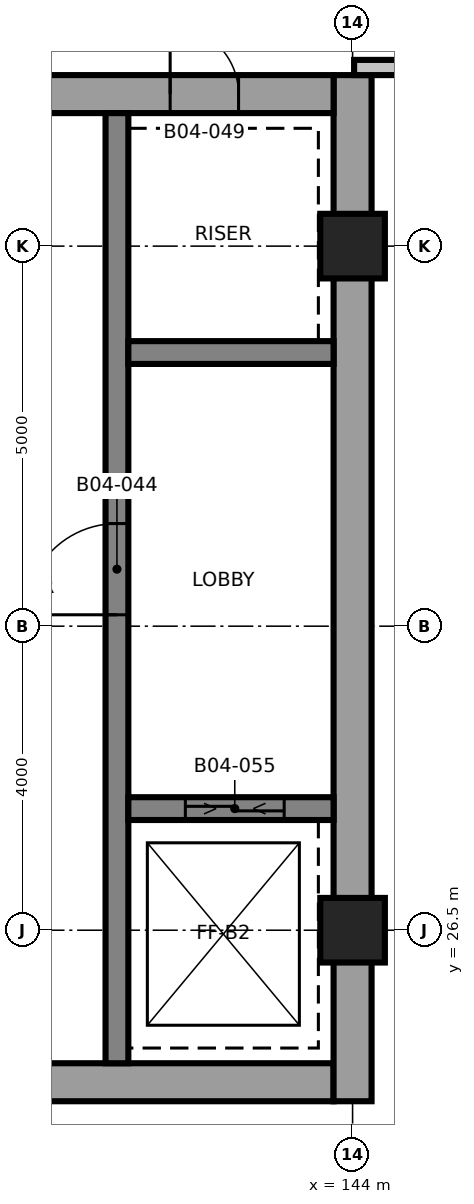
"""IFC4 building model, lengths in metres.
Left out: names, types, materials, properties, quantities, classifications, styles, units other than length and angle.
Written with IfcOpenShell. Run it as: python <this file> out.ifc"""

import sys

from ifc_helpers import new_model, si_unit, direction, frame, frame_2d, origin, origin_2d, place, context, subcontext, project, spatial, rectangle, extrude, element, fill, save


model = new_model("IFC4")
c1 = context("Model", 3, precision=1e-05, world=origin(), true_north=direction((0.0, 1.0)))
c2 = subcontext(c1, "Body", "Model", "MODEL_VIEW")
j1 = project(units=[si_unit("LENGTHUNIT", "METRE"), si_unit("PLANEANGLEUNIT", "RADIAN")], contexts=[c1])
p1 = place(None, origin())
s1 = spatial("IfcSite", under=j1, at=p1, CompositionType="ELEMENT")
p2 = place(p1, origin())
s2 = spatial("IfcBuilding", under=s1, at=p2, CompositionType="ELEMENT")
p3 = place(p2, frame((0.0, 0.0, 63.1)))
s3 = spatial("IfcBuildingStorey", under=s2, at=p3, CompositionType="ELEMENT", Elevation=63.1)
p4 = place(p3, frame((128.75, 24.5, 0.0), z_axis=(0.0, 0.0, 1.0), x_axis=(1.0, 0.0, 0.0)))
e1 = element("IfcWall", 1, at=p4, inside=s3, PredefinedType="SHEAR", context=c2, shape_type="SweptSolid", body=[
    extrude(rectangle(XDim=15.0, YDim=0.5, at=frame_2d((7.5, 0.0))), origin(), (0.0, 0.0, 1.0), 3.7),
])
p5 = place(p4, frame((9.65, 0.0, 0.0)))
e2 = element("IfcOpeningElement", 2, at=p5, cuts=e1, PredefinedType="OPENING", context=c2, shape_type="SweptSolid", body=[
    extrude(rectangle(XDim=1.5, YDim=2.1, at=frame_2d((0.75, 1.05))), frame((0.0, 0.26, 0.0), z_axis=(0.0, -1.0, 0.0), x_axis=(1.0, 0.0, 0.0)), (0.0, 0.0, 1.0), 0.52),
])
p6 = place(p4, frame((1.25, 0.0, 0.0)))
e3 = element("IfcOpeningElement", 3, at=p6, cuts=e1, PredefinedType="OPENING", context=c2, shape_type="SweptSolid", body=[
    extrude(rectangle(XDim=0.9, YDim=2.1, at=frame_2d((0.45, 1.05))), frame((0.0, 0.26, 0.0), z_axis=(0.0, -1.0, 0.0), x_axis=(1.0, 0.0, 0.0)), (0.0, 0.0, 1.0), 0.52),
])
p7 = place(p3, frame((144.0, 24.25, 0.0), z_axis=(0.0, 0.0, 1.0), x_axis=(0.0, 1.0, 0.0)))
e4 = element("IfcWall", 4, at=p7, inside=s3, PredefinedType="SHEAR", context=c2, shape_type="SweptSolid", body=[
    extrude(rectangle(XDim=13.5, YDim=0.5, at=frame_2d((6.75, 0.0))), origin(), (0.0, 0.0, 1.0), 3.7),
])
p8 = place(p3, frame((128.75, 37.5, 0.0), z_axis=(0.0, 0.0, 1.0), x_axis=(1.0, 0.0, 0.0)))
e5 = element("IfcWall", 5, at=p8, inside=s3, PredefinedType="SHEAR", context=c2, shape_type="SweptSolid", body=[
    extrude(rectangle(XDim=15.0, YDim=0.5, at=frame_2d((7.5, 0.0))), origin(), (0.0, 0.0, 1.0), 3.7),
])
p9 = place(p8, frame((9.65, 0.0, 0.0)))
e6 = element("IfcOpeningElement", 6, at=p9, cuts=e5, PredefinedType="OPENING", context=c2, shape_type="SweptSolid", body=[
    extrude(rectangle(XDim=1.5, YDim=2.1, at=frame_2d((0.75, 1.05))), frame((0.0, 0.26, 0.0), z_axis=(0.0, -1.0, 0.0), x_axis=(1.0, 0.0, 0.0)), (0.0, 0.0, 1.0), 0.52),
])
p10 = place(p8, frame((12.85, 0.0, 0.0)))
e7 = element("IfcOpeningElement", 7, at=p10, cuts=e5, PredefinedType="OPENING", context=c2, shape_type="SweptSolid", body=[
    extrude(rectangle(XDim=0.9, YDim=2.1, at=frame_2d((0.45, 1.05))), frame((0.0, 0.26, 0.0), z_axis=(0.0, -1.0, 0.0), x_axis=(1.0, 0.0, 0.0)), (0.0, 0.0, 1.0), 0.52),
])
p11 = place(p8, frame((3.6, 0.0, 0.0)))
e8 = element("IfcOpeningElement", 8, at=p11, cuts=e5, PredefinedType="OPENING", context=c2, shape_type="SweptSolid", body=[
    extrude(rectangle(XDim=0.9, YDim=2.1, at=frame_2d((0.45, 1.05))), frame((0.0, 0.26, 0.0), z_axis=(0.0, -1.0, 0.0), x_axis=(1.0, 0.0, 0.0)), (0.0, 0.0, 1.0), 0.52),
])
p12 = place(p8, frame((6.5, 0.0, 0.0)))
e9 = element("IfcOpeningElement", 9, at=p12, cuts=e5, PredefinedType="OPENING", context=c2, shape_type="SweptSolid", body=[
    extrude(rectangle(XDim=0.9, YDim=2.1, at=frame_2d((0.45, 1.05))), frame((0.0, 0.26, 0.0), z_axis=(0.0, -1.0, 0.0), x_axis=(1.0, 0.0, 0.0)), (0.0, 0.0, 1.0), 0.52),
])
p13 = place(p3, frame((140.9, 24.75, 0.0), z_axis=(0.0, 0.0, 1.0), x_axis=(0.0, 1.0, 0.0)))
e10 = element("IfcWall", 10, at=p13, inside=s3, PredefinedType="SHEAR", context=c2, shape_type="SweptSolid", body=[
    extrude(rectangle(XDim=12.5, YDim=0.3, at=frame_2d((6.25, 0.0))), origin(), (0.0, 0.0, 1.0), 3.7),
])
p14 = place(p13, frame((5.9, 0.0, 0.0)))
e11 = element("IfcOpeningElement", 11, at=p14, cuts=e10, PredefinedType="OPENING", context=c2, shape_type="SweptSolid", body=[
    extrude(rectangle(XDim=1.2, YDim=2.1, at=frame_2d((0.6, 1.05))), frame((0.0, 0.16, 0.0), z_axis=(0.0, -1.0, 0.0), x_axis=(1.0, 0.0, 0.0)), (0.0, 0.0, 1.0), 0.32),
])
p15 = place(p3, frame((141.05, 28.1, 0.0), z_axis=(0.0, 0.0, 1.0), x_axis=(1.0, 0.0, 0.0)))
e12 = element("IfcWall", 12, at=p15, inside=s3, PredefinedType="SHEAR", context=c2, shape_type="SweptSolid", body=[
    extrude(rectangle(XDim=2.7, YDim=0.3, at=frame_2d((1.35, 0.0))), origin(), (0.0, 0.0, 1.0), 3.7),
])
p16 = place(p15, frame((0.75, 0.0, 0.0)))
e13 = element("IfcOpeningElement", 13, at=p16, cuts=e12, PredefinedType="OPENING", context=c2, shape_type="SweptSolid", body=[
    extrude(rectangle(XDim=1.3, YDim=2.4, at=frame_2d((0.65, 1.2))), frame((0.0, 0.16, 0.0), z_axis=(0.0, -1.0, 0.0), x_axis=(1.0, 0.0, 0.0)), (0.0, 0.0, 1.0), 0.32),
])
p17 = place(p3, frame((141.05, 34.1, 0.0), z_axis=(0.0, 0.0, 1.0), x_axis=(1.0, 0.0, 0.0)))
e14 = element("IfcWall", 14, at=p17, inside=s3, PredefinedType="SHEAR", context=c2, shape_type="SweptSolid", body=[
    extrude(rectangle(XDim=2.7, YDim=0.3, at=frame_2d((1.35, 0.0))), origin(), (0.0, 0.0, 1.0), 3.7),
])
for number, where, z_axis, x_axis in (
    (15, (144.0, 26.5, 0.0), (0.0, 0.0, 1.0), (1.0, 0.0, 0.0)),
    (16, (144.0, 35.5, 0.0), (0.0, 0.0, 1.0), (1.0, 0.0, 0.0)),
):
    element("IfcColumn", number, at=place(p3, frame(where, z_axis=z_axis, x_axis=x_axis)), inside=s3, PredefinedType="COLUMN", context=c2, shape_type="SweptSolid", body=[
        extrude(rectangle(XDim=0.85, YDim=0.85, at=origin_2d()), origin(), (0.0, 0.0, 1.0), 3.7),
    ])
p18 = place(p3, frame((144.02, 37.85, 0.0), z_axis=(0.0, 0.0, 1.0), x_axis=(1.0, 0.0, 0.0)))
e17 = element("IfcWall", 17, at=p18, inside=s3, PredefinedType="PARTITIONING", context=c2, shape_type="SweptSolid", body=[
    extrude(rectangle(XDim=3.23, YDim=0.2, at=frame_2d((1.615, 0.0))), origin(), (0.0, 0.0, 1.0), 3.4),
])
p19 = place(p18, frame((1.03, 0.0, 0.0)))
e18 = element("IfcOpeningElement", 18, at=p19, cuts=e17, PredefinedType="OPENING", context=c2, shape_type="SweptSolid", body=[
    extrude(rectangle(XDim=1.5, YDim=2.1, at=frame_2d((0.75, 1.05))), frame((0.0, 0.11, 0.0), z_axis=(0.0, -1.0, 0.0), x_axis=(1.0, 0.0, 0.0)), (0.0, 0.0, 1.0), 0.22),
])
p20 = place(p14, origin())
e19 = element("IfcDoor", 19, at=p20, inside=s3, OperationType="SINGLE_SWING_RIGHT", PredefinedType="DOOR", context=c2, shape_type="SweptSolid", body=[
    extrude(rectangle(XDim=1.2, YDim=2.1, at=frame_2d((0.6, 1.05))), frame((0.0, 0.025, 0.0), z_axis=(0.0, -1.0, 0.0), x_axis=(1.0, 0.0, 0.0)), (0.0, 0.0, 1.0), 0.05),
])
fill(e11, e19)
p21 = place(p10, origin())
e20 = element("IfcDoor", 20, at=p21, inside=s3, OperationType="SINGLE_SWING_RIGHT", PredefinedType="DOOR", context=c2, shape_type="SweptSolid", body=[
    extrude(rectangle(XDim=0.9, YDim=2.1, at=frame_2d((0.45, 1.05))), frame((0.0, 0.025, 0.0), z_axis=(0.0, -1.0, 0.0), x_axis=(1.0, 0.0, 0.0)), (0.0, 0.0, 1.0), 0.05),
])
fill(e7, e20)
p22 = place(p16, origin())
e21 = element("IfcDoor", 21, at=p22, inside=s3, OperationType="SLIDING_TO_LEFT", PredefinedType="DOOR", context=c2, shape_type="SweptSolid", body=[
    extrude(rectangle(XDim=1.3, YDim=2.4, at=frame_2d((0.65, 1.2))), frame((0.0, 0.025, 0.0), z_axis=(0.0, -1.0, 0.0), x_axis=(1.0, 0.0, 0.0)), (0.0, 0.0, 1.0), 0.05),
])
fill(e13, e21)
save(model, sys.argv[1])
